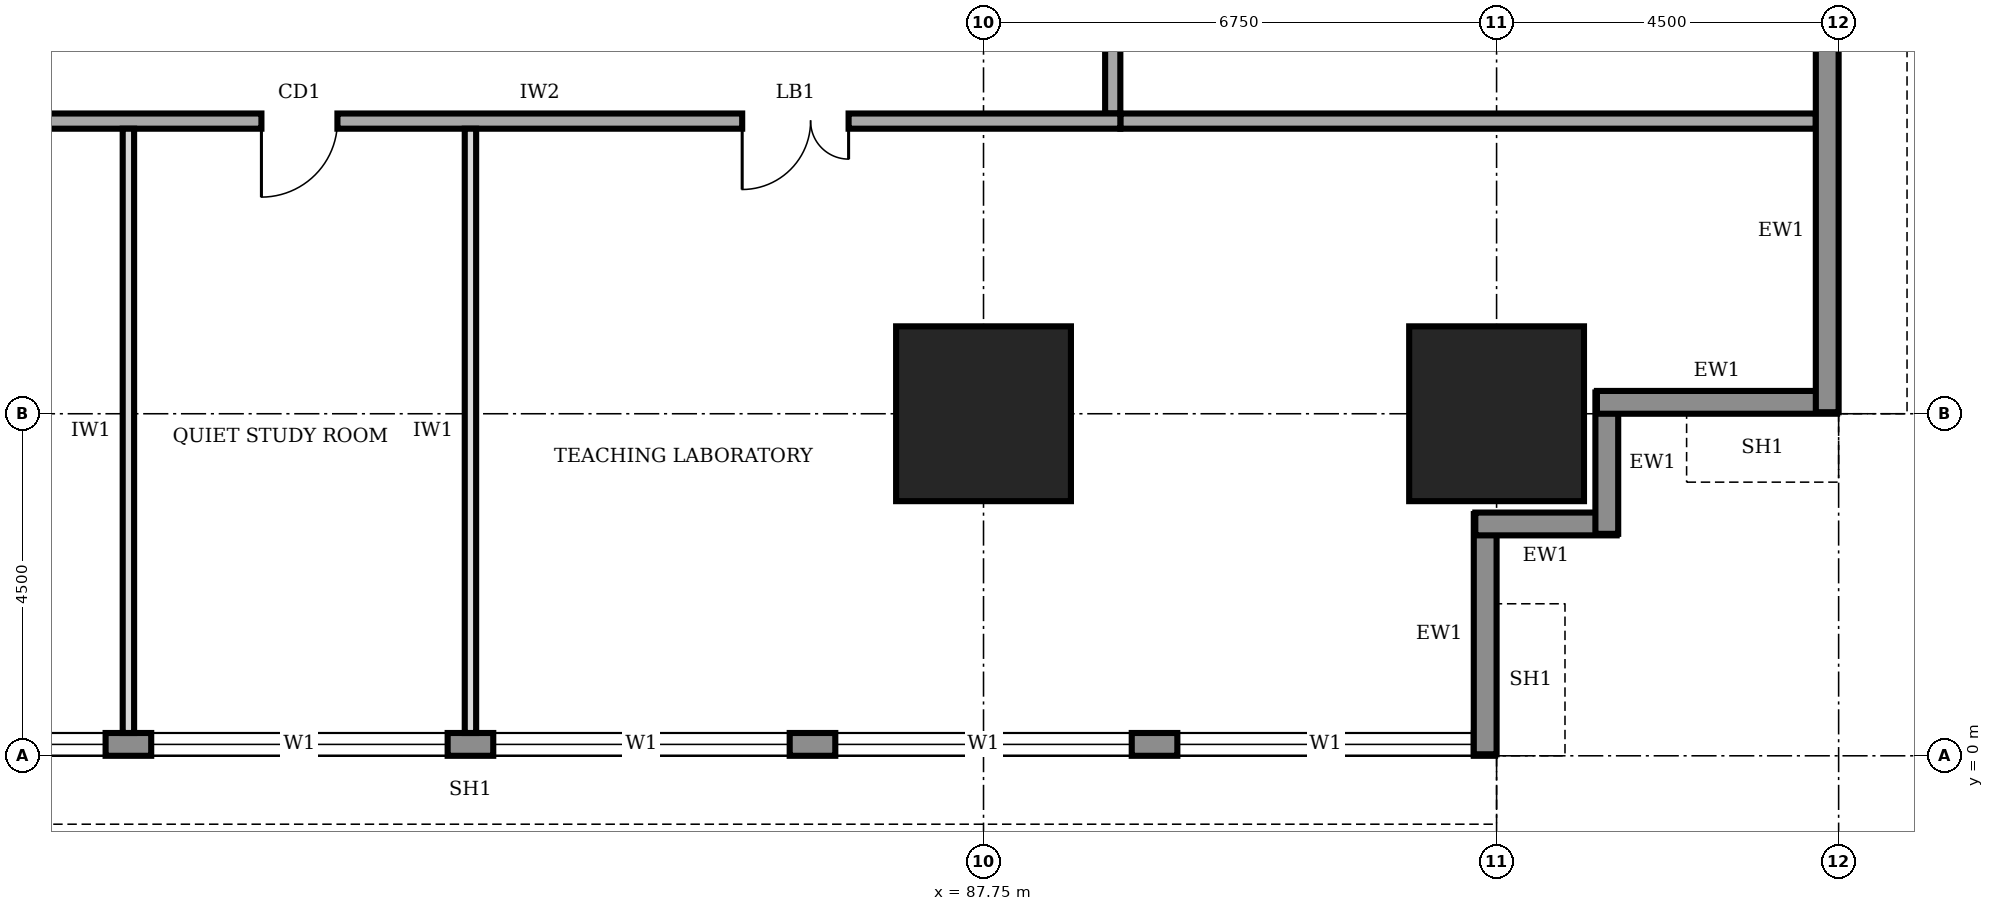
"""IFC4 building model, lengths in metres.
Left out: names, types, materials, properties, quantities, classifications, styles, units other than length and angle.
Written with IfcOpenShell. Run it as: python <this file> out.ifc"""

import sys

from ifc_helpers import new_model, si_unit, direction, frame, frame_2d, origin, origin_2d, place, context, subcontext, project, spatial, rectangle, extrude, element, fill, save


model = new_model("IFC4")
c1 = context("Model", 3, precision=1e-05, world=origin(), true_north=direction((0.0, 1.0)))
c2 = subcontext(c1, "Body", "Model", "MODEL_VIEW")
j1 = project(units=[si_unit("LENGTHUNIT", "METRE"), si_unit("PLANEANGLEUNIT", "RADIAN")], contexts=[c1])
p1 = place(None, origin())
s1 = spatial("IfcSite", under=j1, at=p1, CompositionType="ELEMENT")
p2 = place(p1, origin())
s2 = spatial("IfcBuilding", under=s1, at=p2, CompositionType="ELEMENT")
p3 = place(p2, frame((0.0, 0.0, 37.0)))
s3 = spatial("IfcBuildingStorey", under=s2, at=p3, CompositionType="ELEMENT", Elevation=37.0)
for number, where, z_axis, x_axis in (
    (1, (87.75, 4.5, 0.0), (0.0, 0.0, 1.0), (1.0, 0.0, 0.0)),
    (2, (94.5, 4.5, 0.0), (0.0, 0.0, 1.0), (1.0, 0.0, 0.0)),
):
    element("IfcColumn", number, at=place(p3, frame(where, z_axis=z_axis, x_axis=x_axis)), inside=s3, PredefinedType="COLUMN", context=c2, shape_type="SweptSolid", body=[
        extrude(rectangle(XDim=2.3, YDim=2.3, at=origin_2d()), origin(), (0.0, 0.0, 1.0), 4.0),
    ])
p4 = place(p3, frame((67.52, 0.15, 0.0), z_axis=(0.0, 0.0, 1.0), x_axis=(1.0, 0.0, 0.0)))
e3 = element("IfcWall", 3, at=p4, inside=s3, PredefinedType="STANDARD", context=c2, shape_type="SweptSolid", body=[
    extrude(rectangle(XDim=26.96, YDim=0.3, at=frame_2d((13.48, 0.0))), origin(), (0.0, 0.0, 1.0), 3.75),
])
p5 = place(p4, frame((4.78, 0.0, 0.9)))
e4 = element("IfcOpeningElement", 4, at=p5, cuts=e3, PredefinedType="OPENING", context=c2, shape_type="SweptSolid", body=[
    extrude(rectangle(XDim=3.9, YDim=2.2, at=frame_2d((1.95, 1.1))), frame((0.0, 0.16, 0.0), z_axis=(0.0, -1.0, 0.0), x_axis=(1.0, 0.0, 0.0)), (0.0, 0.0, 1.0), 0.32),
])
p6 = place(p4, frame((9.28, 0.0, 0.9)))
e5 = element("IfcOpeningElement", 5, at=p6, cuts=e3, PredefinedType="OPENING", context=c2, shape_type="SweptSolid", body=[
    extrude(rectangle(XDim=3.9, YDim=2.2, at=frame_2d((1.95, 1.1))), frame((0.0, 0.16, 0.0), z_axis=(0.0, -1.0, 0.0), x_axis=(1.0, 0.0, 0.0)), (0.0, 0.0, 1.0), 0.32),
])
p7 = place(p4, frame((13.78, 0.0, 0.9)))
e6 = element("IfcOpeningElement", 6, at=p7, cuts=e3, PredefinedType="OPENING", context=c2, shape_type="SweptSolid", body=[
    extrude(rectangle(XDim=3.9, YDim=2.2, at=frame_2d((1.95, 1.1))), frame((0.0, 0.16, 0.0), z_axis=(0.0, -1.0, 0.0), x_axis=(1.0, 0.0, 0.0)), (0.0, 0.0, 1.0), 0.32),
])
p8 = place(p4, frame((18.28, 0.0, 0.9)))
e7 = element("IfcOpeningElement", 7, at=p8, cuts=e3, PredefinedType="OPENING", context=c2, shape_type="SweptSolid", body=[
    extrude(rectangle(XDim=3.9, YDim=2.2, at=frame_2d((1.95, 1.1))), frame((0.0, 0.16, 0.0), z_axis=(0.0, -1.0, 0.0), x_axis=(1.0, 0.0, 0.0)), (0.0, 0.0, 1.0), 0.32),
])
p9 = place(p4, frame((22.78, 0.0, 0.9)))
e8 = element("IfcOpeningElement", 8, at=p9, cuts=e3, PredefinedType="OPENING", context=c2, shape_type="SweptSolid", body=[
    extrude(rectangle(XDim=3.9, YDim=2.2, at=frame_2d((1.95, 1.1))), frame((0.0, 0.16, 0.0), z_axis=(0.0, -1.0, 0.0), x_axis=(1.0, 0.0, 0.0)), (0.0, 0.0, 1.0), 0.32),
])
p10 = place(p3, frame((94.35, 0.02, 0.0), z_axis=(0.0, 0.0, 1.0), x_axis=(0.0, 1.0, 0.0)))
e9 = element("IfcWall", 9, at=p10, inside=s3, PredefinedType="STANDARD", context=c2, shape_type="SweptSolid", body=[
    extrude(rectangle(XDim=3.16, YDim=0.3, at=frame_2d((1.58, 0.0))), origin(), (0.0, 0.0, 1.0), 2.85),
])
for number, where, z_axis, x_axis in (
    (10, (94.22, 3.05, 0.0), (0.0, 0.0, 1.0), (1.0, 0.0, 0.0)),
    (11, (95.95, 2.92, 0.0), (0.0, 0.0, 1.0), (0.0, 1.0, 0.0)),
):
    element("IfcWall", number, at=place(p3, frame(where, z_axis=z_axis, x_axis=x_axis)), inside=s3, PredefinedType="STANDARD", context=c2, shape_type="SweptSolid", body=[
        extrude(rectangle(XDim=1.86, YDim=0.3, at=frame_2d((0.93, 0.0))), origin(), (0.0, 0.0, 1.0), 3.75),
    ])
p11 = place(p3, frame((95.82, 4.65, 0.0), z_axis=(0.0, 0.0, 1.0), x_axis=(1.0, 0.0, 0.0)))
e12 = element("IfcWall", 12, at=p11, inside=s3, PredefinedType="STANDARD", context=c2, shape_type="SweptSolid", body=[
    extrude(rectangle(XDim=3.16, YDim=0.3, at=frame_2d((1.58, 0.0))), origin(), (0.0, 0.0, 1.0), 2.85),
])
p12 = place(p3, frame((98.85, 4.52, 0.0), z_axis=(0.0, 0.0, 1.0), x_axis=(0.0, 1.0, 0.0)))
e13 = element("IfcWall", 13, at=p12, inside=s3, PredefinedType="STANDARD", context=c2, shape_type="SweptSolid", body=[
    extrude(rectangle(XDim=31.46, YDim=0.3, at=frame_2d((15.73, 0.0))), origin(), (0.0, 0.0, 1.0), 3.75),
])
p13 = place(p12, frame((4.78, 0.0, 0.9)))
e14 = element("IfcOpeningElement", 14, at=p13, cuts=e13, PredefinedType="OPENING", context=c2, shape_type="SweptSolid", body=[
    extrude(rectangle(XDim=3.9, YDim=2.2, at=frame_2d((1.95, 1.1))), frame((0.0, 0.16, 0.0), z_axis=(0.0, -1.0, 0.0), x_axis=(1.0, 0.0, 0.0)), (0.0, 0.0, 1.0), 0.32),
])
p14 = place(p12, frame((9.28, 0.0, 0.9)))
e15 = element("IfcOpeningElement", 15, at=p14, cuts=e13, PredefinedType="OPENING", context=c2, shape_type="SweptSolid", body=[
    extrude(rectangle(XDim=3.9, YDim=2.2, at=frame_2d((1.95, 1.1))), frame((0.0, 0.16, 0.0), z_axis=(0.0, -1.0, 0.0), x_axis=(1.0, 0.0, 0.0)), (0.0, 0.0, 1.0), 0.32),
])
p15 = place(p12, frame((13.78, 0.0, 0.9)))
e16 = element("IfcOpeningElement", 16, at=p15, cuts=e13, PredefinedType="OPENING", context=c2, shape_type="SweptSolid", body=[
    extrude(rectangle(XDim=3.9, YDim=2.2, at=frame_2d((1.95, 1.1))), frame((0.0, 0.16, 0.0), z_axis=(0.0, -1.0, 0.0), x_axis=(1.0, 0.0, 0.0)), (0.0, 0.0, 1.0), 0.32),
])
p16 = place(p12, frame((18.28, 0.0, 0.9)))
e17 = element("IfcOpeningElement", 17, at=p16, cuts=e13, PredefinedType="OPENING", context=c2, shape_type="SweptSolid", body=[
    extrude(rectangle(XDim=3.9, YDim=2.2, at=frame_2d((1.95, 1.1))), frame((0.0, 0.16, 0.0), z_axis=(0.0, -1.0, 0.0), x_axis=(1.0, 0.0, 0.0)), (0.0, 0.0, 1.0), 0.32),
])
p17 = place(p12, frame((22.78, 0.0, 0.9)))
e18 = element("IfcOpeningElement", 18, at=p17, cuts=e13, PredefinedType="OPENING", context=c2, shape_type="SweptSolid", body=[
    extrude(rectangle(XDim=3.9, YDim=2.2, at=frame_2d((1.95, 1.1))), frame((0.0, 0.16, 0.0), z_axis=(0.0, -1.0, 0.0), x_axis=(1.0, 0.0, 0.0)), (0.0, 0.0, 1.0), 0.32),
])
p18 = place(p12, frame((27.28, 0.0, 0.9)))
e19 = element("IfcOpeningElement", 19, at=p18, cuts=e13, PredefinedType="OPENING", context=c2, shape_type="SweptSolid", body=[
    extrude(rectangle(XDim=3.9, YDim=2.2, at=frame_2d((1.95, 1.1))), frame((0.0, 0.16, 0.0), z_axis=(0.0, -1.0, 0.0), x_axis=(1.0, 0.0, 0.0)), (0.0, 0.0, 1.0), 0.32),
])
p19 = place(p3, frame((72.65, 8.35, 0.0), z_axis=(0.0, 0.0, 1.0), x_axis=(1.0, 0.0, 0.0)))
e20 = element("IfcWall", 20, at=p19, inside=s3, PredefinedType="SOLIDWALL", context=c2, shape_type="SweptSolid", body=[
    extrude(rectangle(XDim=16.9, YDim=0.2, at=frame_2d((8.45, 0.0))), origin(), (0.0, 0.0, 1.0), 3.75),
])
p20 = place(p19, frame((1.325, 0.0, 0.0)))
e21 = element("IfcOpeningElement", 21, at=p20, cuts=e20, PredefinedType="OPENING", context=c2, shape_type="SweptSolid", body=[
    extrude(rectangle(XDim=1.0, YDim=2.1, at=frame_2d((0.5, 1.05))), frame((0.0, 0.11, 0.0), z_axis=(0.0, -1.0, 0.0), x_axis=(1.0, 0.0, 0.0)), (0.0, 0.0, 1.0), 0.22),
])
p21 = place(p19, frame((5.6, 0.0, 0.0)))
e22 = element("IfcOpeningElement", 22, at=p21, cuts=e20, PredefinedType="OPENING", context=c2, shape_type="SweptSolid", body=[
    extrude(rectangle(XDim=1.0, YDim=2.1, at=frame_2d((0.5, 1.05))), frame((0.0, 0.11, 0.0), z_axis=(0.0, -1.0, 0.0), x_axis=(1.0, 0.0, 0.0)), (0.0, 0.0, 1.0), 0.22),
])
p22 = place(p19, frame((11.925, 0.0, 0.0)))
e23 = element("IfcOpeningElement", 23, at=p22, cuts=e20, PredefinedType="OPENING", context=c2, shape_type="SweptSolid", body=[
    extrude(rectangle(XDim=1.4, YDim=2.1, at=frame_2d((0.7, 1.05))), frame((0.0, 0.11, 0.0), z_axis=(0.0, -1.0, 0.0), x_axis=(1.0, 0.0, 0.0)), (0.0, 0.0, 1.0), 0.22),
])
p23 = place(p3, frame((89.45, 8.45, 0.0), z_axis=(0.0, 0.0, 1.0), x_axis=(0.0, 1.0, 0.0)))
e24 = element("IfcWall", 24, at=p23, inside=s3, PredefinedType="SOLIDWALL", context=c2, shape_type="SweptSolid", body=[
    extrude(rectangle(XDim=23.8, YDim=0.2, at=frame_2d((11.9, 0.0))), origin(), (0.0, 0.0, 1.0), 3.75),
])
p24 = place(p23, frame((1.925, 0.0, 0.0)))
e25 = element("IfcOpeningElement", 25, at=p24, cuts=e24, PredefinedType="OPENING", context=c2, shape_type="SweptSolid", body=[
    extrude(rectangle(XDim=1.0, YDim=2.1, at=frame_2d((0.5, 1.05))), frame((0.0, 0.11, 0.0), z_axis=(0.0, -1.0, 0.0), x_axis=(1.0, 0.0, 0.0)), (0.0, 0.0, 1.0), 0.22),
])
p25 = place(p23, frame((5.8, 0.0, 0.0)))
e26 = element("IfcOpeningElement", 26, at=p25, cuts=e24, PredefinedType="OPENING", context=c2, shape_type="SweptSolid", body=[
    extrude(rectangle(XDim=0.9, YDim=2.1, at=frame_2d((0.45, 1.05))), frame((0.0, 0.11, 0.0), z_axis=(0.0, -1.0, 0.0), x_axis=(1.0, 0.0, 0.0)), (0.0, 0.0, 1.0), 0.22),
])
p26 = place(p23, frame((9.0, 0.0, 0.0)))
e27 = element("IfcOpeningElement", 27, at=p26, cuts=e24, PredefinedType="OPENING", context=c2, shape_type="SweptSolid", body=[
    extrude(rectangle(XDim=0.9, YDim=2.1, at=frame_2d((0.45, 1.05))), frame((0.0, 0.11, 0.0), z_axis=(0.0, -1.0, 0.0), x_axis=(1.0, 0.0, 0.0)), (0.0, 0.0, 1.0), 0.22),
])
p27 = place(p23, frame((14.55, 0.0, 0.0)))
e28 = element("IfcOpeningElement", 28, at=p27, cuts=e24, PredefinedType="OPENING", context=c2, shape_type="SweptSolid", body=[
    extrude(rectangle(XDim=0.9, YDim=2.1, at=frame_2d((0.45, 1.05))), frame((0.0, 0.11, 0.0), z_axis=(0.0, -1.0, 0.0), x_axis=(1.0, 0.0, 0.0)), (0.0, 0.0, 1.0), 0.22),
])
p28 = place(p23, frame((17.05, 0.0, 0.0)))
e29 = element("IfcOpeningElement", 29, at=p28, cuts=e24, PredefinedType="OPENING", context=c2, shape_type="SweptSolid", body=[
    extrude(rectangle(XDim=1.0, YDim=2.1, at=frame_2d((0.5, 1.05))), frame((0.0, 0.11, 0.0), z_axis=(0.0, -1.0, 0.0), x_axis=(1.0, 0.0, 0.0)), (0.0, 0.0, 1.0), 0.22),
])
p29 = place(p23, frame((11.95, 0.0, 0.0)))
e30 = element("IfcOpeningElement", 30, at=p29, cuts=e24, PredefinedType="OPENING", context=c2, shape_type="SweptSolid", body=[
    extrude(rectangle(XDim=1.0, YDim=2.1, at=frame_2d((0.5, 1.05))), frame((0.0, 0.11, 0.0), z_axis=(0.0, -1.0, 0.0), x_axis=(1.0, 0.0, 0.0)), (0.0, 0.0, 1.0), 0.22),
])
p30 = place(p23, frame((20.675, 0.0, 0.0)))
e31 = element("IfcOpeningElement", 31, at=p30, cuts=e24, PredefinedType="OPENING", context=c2, shape_type="SweptSolid", body=[
    extrude(rectangle(XDim=1.0, YDim=2.1, at=frame_2d((0.5, 1.05))), frame((0.0, 0.11, 0.0), z_axis=(0.0, -1.0, 0.0), x_axis=(1.0, 0.0, 0.0)), (0.0, 0.0, 1.0), 0.22),
])
p31 = place(p3, frame((89.55, 8.35, 0.0), z_axis=(0.0, 0.0, 1.0), x_axis=(1.0, 0.0, 0.0)))
e32 = element("IfcWall", 32, at=p31, inside=s3, PredefinedType="SOLIDWALL", context=c2, shape_type="SweptSolid", body=[
    extrude(rectangle(XDim=9.15, YDim=0.2, at=frame_2d((4.575, 0.0))), origin(), (0.0, 0.0, 1.0), 3.75),
])
for number, where, z_axis, x_axis in (
    (33, (76.5, 0.3, 0.0), (0.0, 0.0, 1.0), (0.0, 1.0, 0.0)),
    (34, (81.0, 0.3, 0.0), (0.0, 0.0, 1.0), (0.0, 1.0, 0.0)),
):
    element("IfcWall", number, at=place(p3, frame(where, z_axis=z_axis, x_axis=x_axis)), inside=s3, PredefinedType="PARTITIONING", context=c2, shape_type="SweptSolid", body=[
        extrude(rectangle(XDim=7.95, YDim=0.15, at=frame_2d((3.975, 0.0))), origin(), (0.0, 0.0, 1.0), 3.75),
    ])
p32 = place(p5, origin())
e35 = element("IfcWindow", 35, at=p32, inside=s3, PartitioningType="SINGLE_PANEL", PredefinedType="WINDOW", context=c2, shape_type="SweptSolid", body=[
    extrude(rectangle(XDim=3.9, YDim=2.2, at=frame_2d((1.95, 1.1))), frame((0.0, 0.03, 0.0), z_axis=(0.0, -1.0, 0.0), x_axis=(1.0, 0.0, 0.0)), (0.0, 0.0, 1.0), 0.06),
])
fill(e4, e35)
p33 = place(p6, origin())
e36 = element("IfcWindow", 36, at=p33, inside=s3, PartitioningType="SINGLE_PANEL", PredefinedType="WINDOW", context=c2, shape_type="SweptSolid", body=[
    extrude(rectangle(XDim=3.9, YDim=2.2, at=frame_2d((1.95, 1.1))), frame((0.0, 0.03, 0.0), z_axis=(0.0, -1.0, 0.0), x_axis=(1.0, 0.0, 0.0)), (0.0, 0.0, 1.0), 0.06),
])
fill(e5, e36)
p34 = place(p7, origin())
e37 = element("IfcWindow", 37, at=p34, inside=s3, PartitioningType="SINGLE_PANEL", PredefinedType="WINDOW", context=c2, shape_type="SweptSolid", body=[
    extrude(rectangle(XDim=3.9, YDim=2.2, at=frame_2d((1.95, 1.1))), frame((0.0, 0.03, 0.0), z_axis=(0.0, -1.0, 0.0), x_axis=(1.0, 0.0, 0.0)), (0.0, 0.0, 1.0), 0.06),
])
fill(e6, e37)
p35 = place(p8, origin())
e38 = element("IfcWindow", 38, at=p35, inside=s3, PartitioningType="SINGLE_PANEL", PredefinedType="WINDOW", context=c2, shape_type="SweptSolid", body=[
    extrude(rectangle(XDim=3.9, YDim=2.2, at=frame_2d((1.95, 1.1))), frame((0.0, 0.03, 0.0), z_axis=(0.0, -1.0, 0.0), x_axis=(1.0, 0.0, 0.0)), (0.0, 0.0, 1.0), 0.06),
])
fill(e7, e38)
p36 = place(p9, origin())
e39 = element("IfcWindow", 39, at=p36, inside=s3, PartitioningType="SINGLE_PANEL", PredefinedType="WINDOW", context=c2, shape_type="SweptSolid", body=[
    extrude(rectangle(XDim=3.9, YDim=2.2, at=frame_2d((1.95, 1.1))), frame((0.0, 0.03, 0.0), z_axis=(0.0, -1.0, 0.0), x_axis=(1.0, 0.0, 0.0)), (0.0, 0.0, 1.0), 0.06),
])
fill(e8, e39)
p37 = place(p21, frame((1.0, 0.0, 0.0), z_axis=(0.0, 0.0, 1.0), x_axis=(-1.0, 0.0, 0.0)))
e40 = element("IfcDoor", 40, at=p37, inside=s3, OperationType="SINGLE_SWING_RIGHT", PredefinedType="DOOR", context=c2, shape_type="SweptSolid", body=[
    extrude(rectangle(XDim=1.0, YDim=2.1, at=frame_2d((0.5, 1.05))), frame((0.0, 0.025, 0.0), z_axis=(0.0, -1.0, 0.0), x_axis=(1.0, 0.0, 0.0)), (0.0, 0.0, 1.0), 0.05),
])
fill(e22, e40)
p38 = place(p22, frame((1.4, 0.0, 0.0), z_axis=(0.0, 0.0, 1.0), x_axis=(-1.0, 0.0, 0.0)))
e41 = element("IfcDoor", 41, at=p38, inside=s3, OperationType="DOUBLE_DOOR_SINGLE_SWING", PredefinedType="DOOR", context=c2, shape_type="SweptSolid", body=[
    extrude(rectangle(XDim=1.4, YDim=2.1, at=frame_2d((0.7, 1.05))), frame((0.0, 0.025, 0.0), z_axis=(0.0, -1.0, 0.0), x_axis=(1.0, 0.0, 0.0)), (0.0, 0.0, 1.0), 0.05),
])
fill(e23, e41)
save(model, sys.argv[1])
